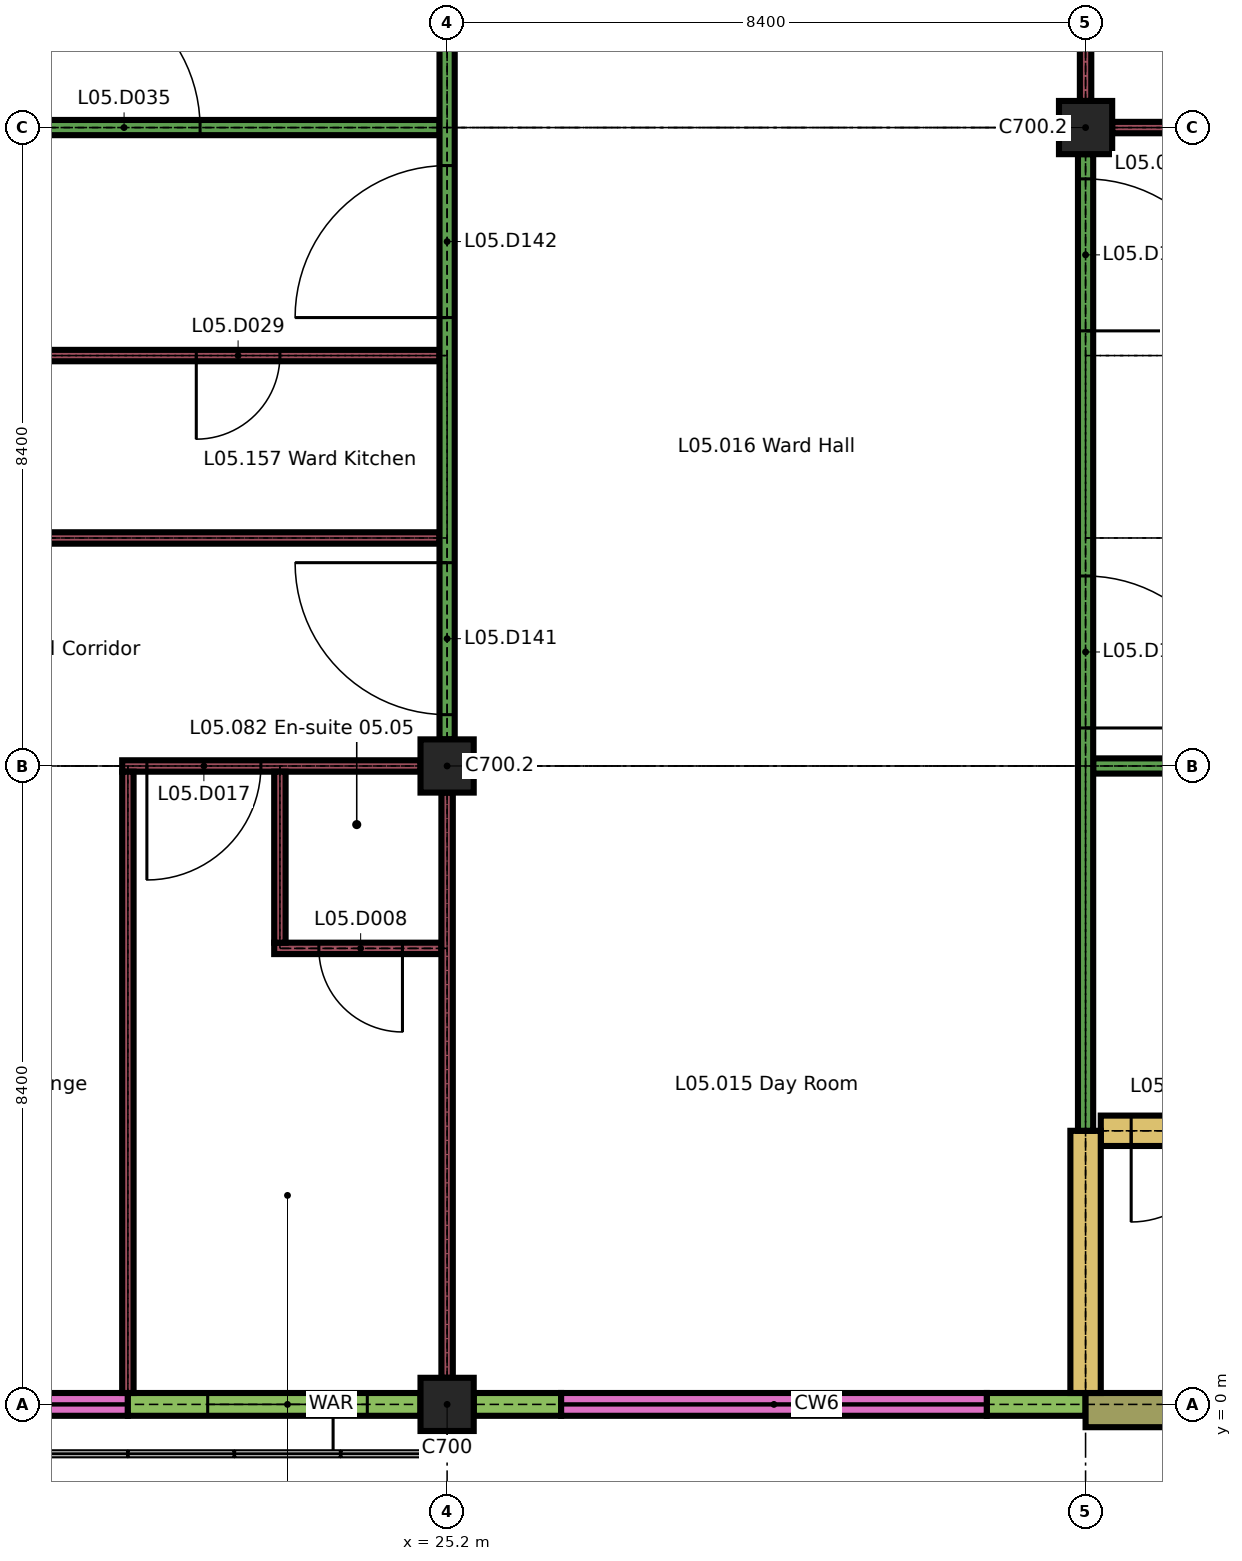
"""IFC4 building model, lengths in metres.
Left out: names, types, materials, properties, quantities, classifications, styles, units other than length and angle.
Written with IfcOpenShell. Run it as: python <this file> out.ifc"""

import sys

from ifc_helpers import new_model, si_unit, direction, frame, frame_2d, origin, origin_2d, place, context, subcontext, project, spatial, rectangle, extrude, element, fill, save


model = new_model("IFC4")
c1 = context("Model", 3, precision=1e-05, world=origin(), true_north=direction((0.0, 1.0)))
c2 = subcontext(c1, "Body", "Model", "MODEL_VIEW")
j1 = project(units=[si_unit("LENGTHUNIT", "METRE"), si_unit("PLANEANGLEUNIT", "RADIAN")], contexts=[c1])
p1 = place(None, origin())
s1 = spatial("IfcSite", under=j1, at=p1, CompositionType="ELEMENT")
p2 = place(p1, origin())
s2 = spatial("IfcBuilding", under=s1, at=p2, CompositionType="ELEMENT")
p3 = place(p2, frame((0.0, 0.0, 22.5)))
s3 = spatial("IfcBuildingStorey", under=s2, at=p3, CompositionType="ELEMENT", Elevation=22.5)
for number, where, z_axis, x_axis in (
    (1, (25.2, 0.0, 0.0), (0.0, 0.0, 1.0), (1.0, 0.0, 0.0)),
    (2, (25.2, 8.4, 0.0), (0.0, 0.0, 1.0), (1.0, 0.0, 0.0)),
    (3, (33.6, 16.8, 0.0), (0.0, 0.0, 1.0), (1.0, 0.0, 0.0)),
):
    element("IfcColumn", number, at=place(p3, frame(where, z_axis=z_axis, x_axis=x_axis)), inside=s3, PredefinedType="COLUMN", context=c2, shape_type="SweptSolid", body=[
        extrude(rectangle(XDim=0.7, YDim=0.7, at=origin_2d()), origin(), (0.0, 0.0, 1.0), 3.26),
    ])
p4 = place(p3, frame((17.15, 0.0, 0.0), z_axis=(0.0, 0.0, 1.0), x_axis=(1.0, 0.0, 0.0)))
e4 = element("IfcWall", 4, at=p4, inside=s3, PredefinedType="SOLIDWALL", context=c2, shape_type="SweptSolid", body=[
    extrude(rectangle(XDim=3.85, YDim=0.3, at=frame_2d((1.925, 0.0))), origin(), (0.0, 0.0, 1.0), 0.6),
])
p5 = place(p3, frame((21.0, 0.0, 0.0), z_axis=(0.0, 0.0, 1.0), x_axis=(1.0, 0.0, 0.0)))
e5 = element("IfcWall", 5, at=p5, inside=s3, PredefinedType="SOLIDWALL", context=c2, shape_type="SweptSolid", body=[
    extrude(rectangle(XDim=3.85, YDim=0.3, at=frame_2d((1.925, 0.0))), origin(), (0.0, 0.0, 1.0), 2.96),
])
p6 = place(p5, frame((1.05, 0.0, 0.9)))
e6 = element("IfcOpeningElement", 6, at=p6, cuts=e5, PredefinedType="OPENING", context=c2, shape_type="SweptSolid", body=[
    extrude(rectangle(XDim=2.1, YDim=1.5, at=frame_2d((1.05, 0.75))), frame((0.0, 0.16, 0.0), z_axis=(0.0, -1.0, 0.0), x_axis=(1.0, 0.0, 0.0)), (0.0, 0.0, 1.0), 0.32),
])
p7 = place(p3, frame((25.55, 0.0, 0.0), z_axis=(0.0, 0.0, 1.0), x_axis=(1.0, 0.0, 0.0)))
e7 = element("IfcWall", 7, at=p7, inside=s3, PredefinedType="SOLIDWALL", context=c2, shape_type="SweptSolid", body=[
    extrude(rectangle(XDim=1.15, YDim=0.3, at=frame_2d((0.575, 0.0))), origin(), (0.0, 0.0, 1.0), 2.96),
])
p8 = place(p3, frame((32.3, 0.0, 0.0), z_axis=(0.0, 0.0, 1.0), x_axis=(1.0, 0.0, 0.0)))
e8 = element("IfcWall", 8, at=p8, inside=s3, PredefinedType="SOLIDWALL", context=c2, shape_type="SweptSolid", body=[
    extrude(rectangle(XDim=1.3, YDim=0.3, at=frame_2d((0.65, 0.0))), origin(), (0.0, 0.0, 1.0), 2.96),
])
p9 = place(p3, frame((26.7, 0.0, 0.0), z_axis=(0.0, 0.0, 1.0), x_axis=(1.0, 0.0, 0.0)))
e9 = element("IfcWall", 9, at=p9, inside=s3, PredefinedType="SOLIDWALL", context=c2, shape_type="SweptSolid", body=[
    extrude(rectangle(XDim=5.6, YDim=0.3, at=frame_2d((2.8, 0.0))), origin(), (0.0, 0.0, 1.0), 0.6),
])
p10 = place(p3, frame((33.6, -0.075, 0.0), z_axis=(0.0, 0.0, 1.0), x_axis=(1.0, 0.0, 0.0)))
e10 = element("IfcWall", 10, at=p10, inside=s3, PredefinedType="SOLIDWALL", context=c2, shape_type="SweptSolid", body=[
    extrude(rectangle(XDim=3.15, YDim=0.45, at=frame_2d((1.575, 0.0))), origin(), (0.0, 0.0, 1.0), 3.26),
])
p11 = place(p3, frame((33.8, 3.6, 0.0), z_axis=(0.0, 0.0, 1.0), x_axis=(1.0, 0.0, 0.0)))
e11 = element("IfcWall", 11, at=p11, inside=s3, PredefinedType="SHEAR", context=c2, shape_type="SweptSolid", body=[
    extrude(rectangle(XDim=8.05, YDim=0.4, at=frame_2d((4.025, 0.0))), origin(), (0.0, 0.0, 1.0), 3.26),
])
p12 = place(p11, frame((0.4, 0.0, 0.0)))
e12 = element("IfcOpeningElement", 12, at=p12, cuts=e11, PredefinedType="OPENING", context=c2, shape_type="SweptSolid", body=[
    extrude(rectangle(XDim=1.2, YDim=2.1, at=frame_2d((0.6, 1.05))), frame((0.0, 0.21, 0.0), z_axis=(0.0, -1.0, 0.0), x_axis=(1.0, 0.0, 0.0)), (0.0, 0.0, 1.0), 0.42),
])
p13 = place(p3, frame((22.925, 6.0, 0.0), z_axis=(0.0, 0.0, 1.0), x_axis=(1.0, 0.0, 0.0)))
e13 = element("IfcWall", 13, at=p13, inside=s3, PredefinedType="PARTITIONING", context=c2, shape_type="SweptSolid", body=[
    extrude(rectangle(XDim=2.2, YDim=0.15, at=frame_2d((1.1, 0.0))), origin(), (0.0, 0.0, 1.0), 3.26),
])
p14 = place(p13, frame((0.587, 0.0, 0.0)))
e14 = element("IfcOpeningElement", 14, at=p14, cuts=e13, PredefinedType="OPENING", context=c2, shape_type="SweptSolid", body=[
    extrude(rectangle(XDim=1.1, YDim=2.1, at=frame_2d((0.55, 1.05))), frame((0.0, 0.085, 0.0), z_axis=(0.0, -1.0, 0.0), x_axis=(1.0, 0.0, 0.0)), (0.0, 0.0, 1.0), 0.17),
])
p15 = place(p3, frame((20.925, 8.4, 0.0), z_axis=(0.0, 0.0, 1.0), x_axis=(1.0, 0.0, 0.0)))
e15 = element("IfcWall", 15, at=p15, inside=s3, PredefinedType="PARTITIONING", context=c2, shape_type="SweptSolid", body=[
    extrude(rectangle(XDim=3.925, YDim=0.15, at=frame_2d((1.962, 0.0))), origin(), (0.0, 0.0, 1.0), 3.26),
])
p16 = place(p15, frame((0.325, 0.0, 0.0)))
e16 = element("IfcOpeningElement", 16, at=p16, cuts=e15, PredefinedType="OPENING", context=c2, shape_type="SweptSolid", body=[
    extrude(rectangle(XDim=1.5, YDim=2.4, at=frame_2d((0.75, 1.2))), frame((0.0, 0.085, 0.0), z_axis=(0.0, -1.0, 0.0), x_axis=(1.0, 0.0, 0.0)), (0.0, 0.0, 1.0), 0.17),
])
p17 = place(p3, frame((33.7, 8.4, 0.0), z_axis=(0.0, 0.0, 1.0), x_axis=(1.0, 0.0, 0.0)))
e17 = element("IfcWall", 17, at=p17, inside=s3, PredefinedType="PARTITIONING", context=c2, shape_type="SweptSolid", body=[
    extrude(rectangle(XDim=8.15, YDim=0.2, at=frame_2d((4.075, 0.0))), origin(), (0.0, 0.0, 1.0), 3.26),
])
p18 = place(p17, frame((3.075, 0.0, 0.0)))
e18 = element("IfcOpeningElement", 18, at=p18, cuts=e17, PredefinedType="OPENING", context=c2, shape_type="SweptSolid", body=[
    extrude(rectangle(XDim=2.0, YDim=2.4, at=frame_2d((1.0, 1.2))), frame((0.0, 0.11, 0.0), z_axis=(0.0, -1.0, 0.0), x_axis=(1.0, 0.0, 0.0)), (0.0, 0.0, 1.0), 0.22),
])
p19 = place(p3, frame((19.725, 11.4, 0.0), z_axis=(0.0, 0.0, 1.0), x_axis=(1.0, 0.0, 0.0)))
e19 = element("IfcWall", 19, at=p19, inside=s3, PredefinedType="PARTITIONING", context=c2, shape_type="SweptSolid", body=[
    extrude(rectangle(XDim=5.375, YDim=0.15, at=frame_2d((2.688, 0.0))), origin(), (0.0, 0.0, 1.0), 3.26),
])
p20 = place(p3, frame((11.325, 13.8, 0.0), z_axis=(0.0, 0.0, 1.0), x_axis=(1.0, 0.0, 0.0)))
e20 = element("IfcWall", 20, at=p20, inside=s3, PredefinedType="PARTITIONING", context=c2, shape_type="SweptSolid", body=[
    extrude(rectangle(XDim=13.775, YDim=0.15, at=frame_2d((6.888, 0.0))), origin(), (0.0, 0.0, 1.0), 3.26),
])
p21 = place(p20, frame((10.575, 0.0, 0.0)))
e21 = element("IfcOpeningElement", 21, at=p21, cuts=e20, PredefinedType="OPENING", context=c2, shape_type="SweptSolid", body=[
    extrude(rectangle(XDim=1.1, YDim=2.1, at=frame_2d((0.55, 1.05))), frame((0.0, 0.085, 0.0), z_axis=(0.0, -1.0, 0.0), x_axis=(1.0, 0.0, 0.0)), (0.0, 0.0, 1.0), 0.17),
])
p22 = place(p3, frame((16.7, 16.8, 0.0), z_axis=(0.0, 0.0, 1.0), x_axis=(1.0, 0.0, 0.0)))
e22 = element("IfcWall", 22, at=p22, inside=s3, PredefinedType="PARTITIONING", context=c2, shape_type="SweptSolid", body=[
    extrude(rectangle(XDim=8.4, YDim=0.2, at=frame_2d((4.2, 0.0))), origin(), (0.0, 0.0, 1.0), 3.26),
])
p23 = place(p22, frame((3.25, 0.0, 0.0)))
e23 = element("IfcOpeningElement", 23, at=p23, cuts=e22, PredefinedType="OPENING", context=c2, shape_type="SweptSolid", body=[
    extrude(rectangle(XDim=2.0, YDim=2.4, at=frame_2d((1.0, 1.2))), frame((0.0, 0.11, 0.0), z_axis=(0.0, -1.0, 0.0), x_axis=(1.0, 0.0, 0.0)), (0.0, 0.0, 1.0), 0.22),
])
p24 = place(p3, frame((33.95, 16.8, 0.0), z_axis=(0.0, 0.0, 1.0), x_axis=(1.0, 0.0, 0.0)))
e24 = element("IfcWall", 24, at=p24, inside=s3, PredefinedType="PARTITIONING", context=c2, shape_type="SweptSolid", body=[
    extrude(rectangle(XDim=7.675, YDim=0.15, at=frame_2d((3.837, 0.0))), origin(), (0.0, 0.0, 1.0), 3.26),
])
p25 = place(p24, frame((2.1, 0.0, 0.0)))
e25 = element("IfcOpeningElement", 25, at=p25, cuts=e24, PredefinedType="OPENING", context=c2, shape_type="SweptSolid", body=[
    extrude(rectangle(XDim=1.5, YDim=2.4, at=frame_2d((0.75, 1.2))), frame((0.0, 0.085, 0.0), z_axis=(0.0, -1.0, 0.0), x_axis=(1.0, 0.0, 0.0)), (0.0, 0.0, 1.0), 0.17),
])
p26 = place(p24, frame((4.1, 0.0, 0.0)))
e26 = element("IfcOpeningElement", 26, at=p26, cuts=e24, PredefinedType="OPENING", context=c2, shape_type="SweptSolid", body=[
    extrude(rectangle(XDim=1.5, YDim=2.4, at=frame_2d((0.75, 1.2))), frame((0.0, 0.085, 0.0), z_axis=(0.0, -1.0, 0.0), x_axis=(1.0, 0.0, 0.0)), (0.0, 0.0, 1.0), 0.17),
])
p27 = place(p3, frame((21.0, 0.15, 0.0), z_axis=(0.0, 0.0, 1.0), x_axis=(0.0, 1.0, 0.0)))
e27 = element("IfcWall", 27, at=p27, inside=s3, PredefinedType="PARTITIONING", context=c2, shape_type="SweptSolid", body=[
    extrude(rectangle(XDim=8.175, YDim=0.15, at=frame_2d((4.087, 0.0))), origin(), (0.0, 0.0, 1.0), 3.26),
])
p28 = place(p3, frame((23.0, 6.075, 0.0), z_axis=(0.0, 0.0, 1.0), x_axis=(0.0, 1.0, 0.0)))
e28 = element("IfcWall", 28, at=p28, inside=s3, PredefinedType="PARTITIONING", context=c2, shape_type="SweptSolid", body=[
    extrude(rectangle(XDim=2.25, YDim=0.15, at=frame_2d((1.125, 0.0))), origin(), (0.0, 0.0, 1.0), 3.26),
])
p29 = place(p3, frame((25.2, 0.35, 0.0), z_axis=(0.0, 0.0, 1.0), x_axis=(0.0, 1.0, 0.0)))
e29 = element("IfcWall", 29, at=p29, inside=s3, PredefinedType="PARTITIONING", context=c2, shape_type="SweptSolid", body=[
    extrude(rectangle(XDim=7.7, YDim=0.15, at=frame_2d((3.85, 0.0))), origin(), (0.0, 0.0, 1.0), 3.26),
])
p30 = place(p3, frame((25.2, 8.75, 0.0), z_axis=(0.0, 0.0, 1.0), x_axis=(0.0, 1.0, 0.0)))
e30 = element("IfcWall", 30, at=p30, inside=s3, PredefinedType="PARTITIONING", context=c2, shape_type="SweptSolid", body=[
    extrude(rectangle(XDim=12.85, YDim=0.2, at=frame_2d((6.425, 0.0))), origin(), (0.0, 0.0, 1.0), 3.26),
])
p31 = place(p30, frame((0.325, 0.0, 0.0)))
e31 = element("IfcOpeningElement", 31, at=p31, cuts=e30, PredefinedType="OPENING", context=c2, shape_type="SweptSolid", body=[
    extrude(rectangle(XDim=2.0, YDim=2.4, at=frame_2d((1.0, 1.2))), frame((0.0, 0.11, 0.0), z_axis=(0.0, -1.0, 0.0), x_axis=(1.0, 0.0, 0.0)), (0.0, 0.0, 1.0), 0.22),
])
p32 = place(p30, frame((5.55, 0.0, 0.0)))
e32 = element("IfcOpeningElement", 32, at=p32, cuts=e30, PredefinedType="OPENING", context=c2, shape_type="SweptSolid", body=[
    extrude(rectangle(XDim=2.0, YDim=2.4, at=frame_2d((1.0, 1.2))), frame((0.0, 0.11, 0.0), z_axis=(0.0, -1.0, 0.0), x_axis=(1.0, 0.0, 0.0)), (0.0, 0.0, 1.0), 0.22),
])
p33 = place(p3, frame((33.6, 0.15, 0.0), z_axis=(0.0, 0.0, 1.0), x_axis=(0.0, 1.0, 0.0)))
e33 = element("IfcWall", 33, at=p33, inside=s3, PredefinedType="SHEAR", context=c2, shape_type="SweptSolid", body=[
    extrude(rectangle(XDim=3.45, YDim=0.4, at=frame_2d((1.725, 0.0))), origin(), (0.0, 0.0, 1.0), 3.26),
])
p34 = place(p3, frame((33.6, 3.6, 0.0), z_axis=(0.0, 0.0, 1.0), x_axis=(0.0, 1.0, 0.0)))
e34 = element("IfcWall", 34, at=p34, inside=s3, PredefinedType="PARTITIONING", context=c2, shape_type="SweptSolid", body=[
    extrude(rectangle(XDim=12.85, YDim=0.2, at=frame_2d((6.425, 0.0))), origin(), (0.0, 0.0, 1.0), 3.26),
])
p35 = place(p34, frame((5.3, 0.0, 0.0)))
e35 = element("IfcOpeningElement", 35, at=p35, cuts=e34, PredefinedType="OPENING", context=c2, shape_type="SweptSolid", body=[
    extrude(rectangle(XDim=2.0, YDim=2.4, at=frame_2d((1.0, 1.2))), frame((0.0, 0.11, 0.0), z_axis=(0.0, -1.0, 0.0), x_axis=(1.0, 0.0, 0.0)), (0.0, 0.0, 1.0), 0.22),
])
p36 = place(p34, frame((10.525, 0.0, 0.0)))
e36 = element("IfcOpeningElement", 36, at=p36, cuts=e34, PredefinedType="OPENING", context=c2, shape_type="SweptSolid", body=[
    extrude(rectangle(XDim=2.0, YDim=2.4, at=frame_2d((1.0, 1.2))), frame((0.0, 0.11, 0.0), z_axis=(0.0, -1.0, 0.0), x_axis=(1.0, 0.0, 0.0)), (0.0, 0.0, 1.0), 0.22),
])
p37 = place(p3, frame((33.6, 17.15, 0.0), z_axis=(0.0, 0.0, 1.0), x_axis=(0.0, 1.0, 0.0)))
e37 = element("IfcWall", 37, at=p37, inside=s3, PredefinedType="PARTITIONING", context=c2, shape_type="SweptSolid", body=[
    extrude(rectangle(XDim=7.7, YDim=0.15, at=frame_2d((3.85, 0.0))), origin(), (0.0, 0.0, 1.0), 3.26),
])
p38 = place(p6, origin())
e38 = element("IfcWindow", 38, at=p38, inside=s3, PartitioningType="DOUBLE_PANEL_VERTICAL", PredefinedType="WINDOW", context=c2, shape_type="SweptSolid", body=[
    extrude(rectangle(XDim=2.1, YDim=1.5, at=frame_2d((1.05, 0.75))), frame((0.0, 0.05, 0.0), z_axis=(0.0, -1.0, 0.0), x_axis=(1.0, 0.0, 0.0)), (0.0, 0.0, 1.0), 0.1),
])
fill(e6, e38)
p39 = place(p12, origin())
e39 = element("IfcDoor", 39, at=p39, inside=s3, OperationType="SINGLE_SWING_LEFT", PredefinedType="DOOR", context=c2, shape_type="SweptSolid", body=[
    extrude(rectangle(XDim=1.2, YDim=2.1, at=frame_2d((0.6, 1.05))), frame((0.0, 0.025, 0.0), z_axis=(0.0, -1.0, 0.0), x_axis=(1.0, 0.0, 0.0)), (0.0, 0.0, 1.0), 0.05),
])
fill(e12, e39)
p40 = place(p14, origin())
e40 = element("IfcDoor", 40, at=p40, inside=s3, OperationType="SINGLE_SWING_RIGHT", PredefinedType="DOOR", context=c2, shape_type="SweptSolid", body=[
    extrude(rectangle(XDim=1.1, YDim=2.1, at=frame_2d((0.55, 1.05))), frame((0.0, 0.025, 0.0), z_axis=(0.0, -1.0, 0.0), x_axis=(1.0, 0.0, 0.0)), (0.0, 0.0, 1.0), 0.05),
])
fill(e14, e40)
p41 = place(p16, origin())
e41 = element("IfcDoor", 41, at=p41, inside=s3, OperationType="SINGLE_SWING_LEFT", PredefinedType="DOOR", context=c2, shape_type="SweptSolid", body=[
    extrude(rectangle(XDim=1.5, YDim=2.4, at=frame_2d((0.75, 1.2))), frame((0.0, 0.03, 0.0), z_axis=(0.0, -1.0, 0.0), x_axis=(1.0, 0.0, 0.0)), (0.0, 0.0, 1.0), 0.06),
])
fill(e16, e41)
p42 = place(p21, origin())
e42 = element("IfcDoor", 42, at=p42, inside=s3, OperationType="SINGLE_SWING_LEFT", PredefinedType="DOOR", context=c2, shape_type="SweptSolid", body=[
    extrude(rectangle(XDim=1.1, YDim=2.1, at=frame_2d((0.55, 1.05))), frame((0.0, 0.025, 0.0), z_axis=(0.0, -1.0, 0.0), x_axis=(1.0, 0.0, 0.0)), (0.0, 0.0, 1.0), 0.05),
])
fill(e21, e42)
p43 = place(p23, origin())
e43 = element("IfcDoor", 43, at=p43, inside=s3, OperationType="SINGLE_SWING_RIGHT", PredefinedType="DOOR", context=c2, shape_type="SweptSolid", body=[
    extrude(rectangle(XDim=2.0, YDim=2.4, at=frame_2d((1.0, 1.2))), frame((0.0, 0.03, 0.0), z_axis=(0.0, -1.0, 0.0), x_axis=(1.0, 0.0, 0.0)), (0.0, 0.0, 1.0), 0.06),
])
fill(e23, e43)
p44 = place(p31, origin())
e44 = element("IfcDoor", 44, at=p44, inside=s3, OperationType="SINGLE_SWING_LEFT", PredefinedType="DOOR", context=c2, shape_type="SweptSolid", body=[
    extrude(rectangle(XDim=2.0, YDim=2.4, at=frame_2d((1.0, 1.2))), frame((0.0, 0.03, 0.0), z_axis=(0.0, -1.0, 0.0), x_axis=(1.0, 0.0, 0.0)), (0.0, 0.0, 1.0), 0.06),
])
fill(e31, e44)
p45 = place(p32, origin())
e45 = element("IfcDoor", 45, at=p45, inside=s3, OperationType="SINGLE_SWING_RIGHT", PredefinedType="DOOR", context=c2, shape_type="SweptSolid", body=[
    extrude(rectangle(XDim=2.0, YDim=2.4, at=frame_2d((1.0, 1.2))), frame((0.0, 0.03, 0.0), z_axis=(0.0, -1.0, 0.0), x_axis=(1.0, 0.0, 0.0)), (0.0, 0.0, 1.0), 0.06),
])
fill(e32, e45)
p46 = place(p35, origin())
e46 = element("IfcDoor", 46, at=p46, inside=s3, OperationType="SINGLE_SWING_LEFT", PredefinedType="DOOR", context=c2, shape_type="SweptSolid", body=[
    extrude(rectangle(XDim=2.0, YDim=2.4, at=frame_2d((1.0, 1.2))), frame((0.0, 0.03, 0.0), z_axis=(0.0, -1.0, 0.0), x_axis=(1.0, 0.0, 0.0)), (0.0, 0.0, 1.0), 0.06),
])
fill(e35, e46)
p47 = place(p36, origin())
e47 = element("IfcDoor", 47, at=p47, inside=s3, OperationType="SINGLE_SWING_LEFT", PredefinedType="DOOR", context=c2, shape_type="SweptSolid", body=[
    extrude(rectangle(XDim=2.0, YDim=2.4, at=frame_2d((1.0, 1.2))), frame((0.0, 0.03, 0.0), z_axis=(0.0, -1.0, 0.0), x_axis=(1.0, 0.0, 0.0)), (0.0, 0.0, 1.0), 0.06),
])
fill(e36, e47)
save(model, sys.argv[1])
